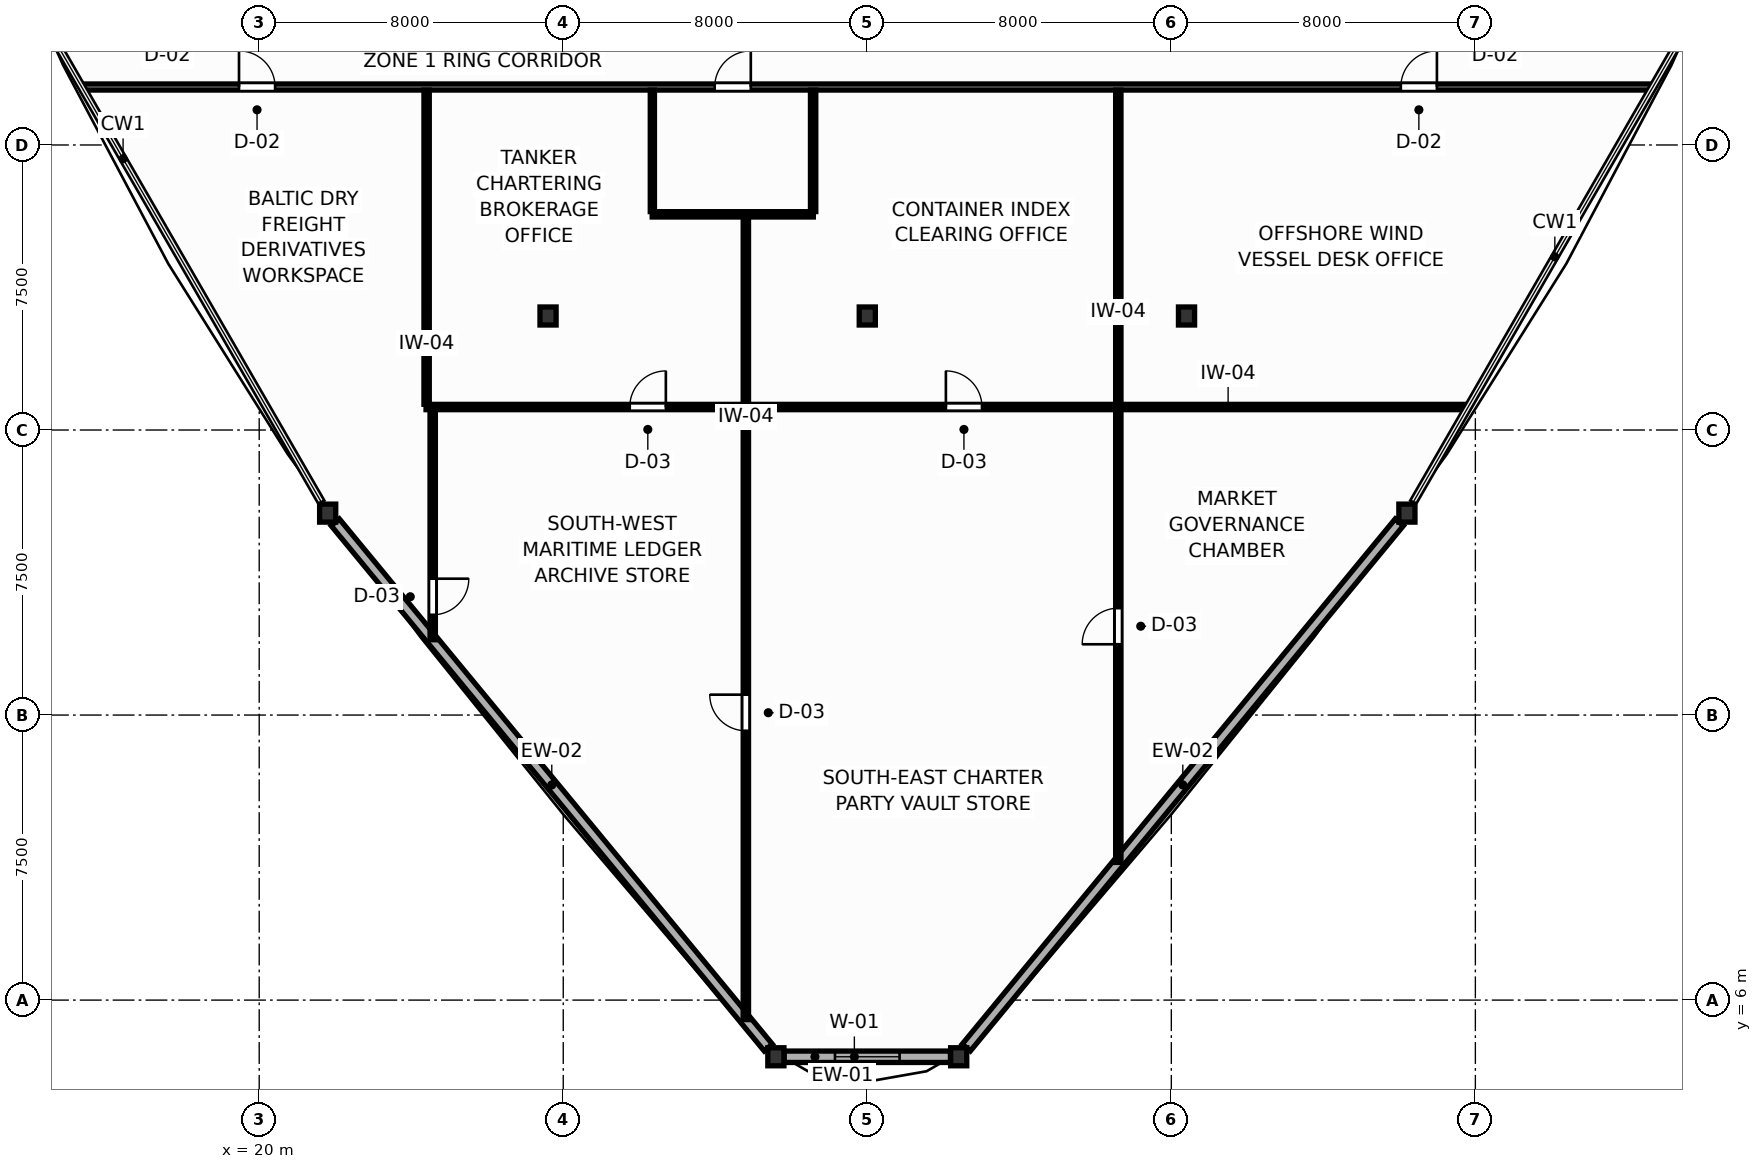
"""IFC4 building model, lengths in metres.
Left out: names, types, materials, properties, quantities, classifications, styles, units other than length and angle.
Written with IfcOpenShell. Run it as: python <this file> out.ifc"""

import sys

from ifc_helpers import new_model, si_unit, direction, frame, frame_2d, origin, origin_2d, place, context, subcontext, project, spatial, rectangle, i_section, extrude, source, transform, mapped, element, fill, save


model = new_model("IFC4")
c1 = context("Model", 3, precision=1e-05, world=origin(), true_north=direction((0.0, 1.0)))
c2 = subcontext(c1, "Body", "Model", "MODEL_VIEW")
j1 = project(units=[si_unit("LENGTHUNIT", "METRE"), si_unit("PLANEANGLEUNIT", "RADIAN")], contexts=[c1])
p1 = place(None, origin())
s1 = spatial("IfcSite", under=j1, at=p1, CompositionType="ELEMENT")
p2 = place(p1, origin())
s2 = spatial("IfcBuilding", under=s1, at=p2, CompositionType="ELEMENT")
p3 = place(p2, frame((0.0, 0.0, 47.4)))
s3 = spatial("IfcBuildingStorey", under=s2, at=p3, CompositionType="ELEMENT", Elevation=47.4)
m1 = source(origin(), c2, "Body", "SweptSolid", [
    extrude(i_section(OverallWidth=0.424, OverallDepth=0.474, WebThickness=0.045, FlangeThickness=0.072, FilletRadius=0.015, at=origin_2d()), origin(), (0.0, 0.0, 1.0), 3.9),
])
for number, where, z_axis, x_axis in (
    (1, (27.6, 24.0, 0.0), (0.0, 0.0, 1.0), (1.0, 0.0, 0.0)),
    (2, (44.4, 24.0, 0.0), (0.0, 0.0, 1.0), (1.0, 0.0, 0.0)),
    (3, (36.0, 24.0, 0.0), (0.0, 0.0, 1.0), (1.0, 0.0, 0.0)),
    (4, (21.802, 18.813, 0.0), (0.0, 0.0, 1.0), (1.0, 0.0, 0.0)),
    (5, (33.595, 4.509, 0.0), (0.0, 0.0, 1.0), (1.0, 0.0, 0.0)),
    (6, (38.405, 4.509, 0.0), (0.0, 0.0, 1.0), (1.0, 0.0, 0.0)),
    (7, (50.198, 18.813, 0.0), (0.0, 0.0, 1.0), (1.0, 0.0, 0.0)),
):
    element("IfcColumn", number, at=place(p3, frame(where, z_axis=z_axis, x_axis=x_axis)), inside=s3, PredefinedType="COLUMN", context=c2, shape_type="MappedRepresentation", body=[
        mapped(m1, transform((0.0, 0.0, 0.0), scale=1.0)),
    ])
p4 = place(p3, frame((22.001, 18.572, 0.0), z_axis=(0.0, 0.0, 1.0), x_axis=(0.636134749951, -0.771577980443, 0.0)))
e8 = element("IfcWall", 8, at=p4, inside=s3, PredefinedType="SOLIDWALL", context=c2, shape_type="SweptSolid", body=[
    extrude(rectangle(XDim=17.912, YDim=0.28, at=frame_2d((8.956, 0.0))), origin(), (0.0, 0.0, 1.0), 3.23),
])
p5 = place(p3, frame((33.812, 4.509, 0.0), z_axis=(0.0, 0.0, 1.0), x_axis=(1.0, 0.0, 0.0)))
e9 = element("IfcWall", 9, at=p5, inside=s3, PredefinedType="SOLIDWALL", context=c2, shape_type="SweptSolid", body=[
    extrude(rectangle(XDim=4.376, YDim=0.3, at=frame_2d((2.188, 0.0))), origin(), (0.0, 0.0, 1.0), 3.23),
])
p6 = place(p5, frame((1.338, 0.0, 0.75)))
e10 = element("IfcOpeningElement", 10, at=p6, cuts=e9, PredefinedType="OPENING", context=c2, shape_type="SweptSolid", body=[
    extrude(rectangle(XDim=1.7, YDim=1.75, at=frame_2d((0.85, 0.875))), frame((0.0, 0.16, 0.0), z_axis=(0.0, -1.0, 0.0), x_axis=(1.0, 0.0, 0.0)), (0.0, 0.0, 1.0), 0.32),
])
p7 = place(p3, frame((38.605, 4.751, 0.0), z_axis=(0.0, 0.0, 1.0), x_axis=(0.636134749951, 0.771577980443, 0.0)))
e11 = element("IfcWall", 11, at=p7, inside=s3, PredefinedType="SOLIDWALL", context=c2, shape_type="SweptSolid", body=[
    extrude(rectangle(XDim=17.912, YDim=0.28, at=frame_2d((8.956, 0.0))), origin(), (0.0, 0.0, 1.0), 3.23),
])
p8 = place(p3, frame((15.348, 30.025, 0.0), z_axis=(0.0, 0.0, 1.0), x_axis=(1.0, 0.0, 0.0)))
e12 = element("IfcWall", 12, at=p8, inside=s3, PredefinedType="PARTITIONING", context=c2, shape_type="SweptSolid", body=[
    extrude(rectangle(XDim=41.303, YDim=0.16, at=frame_2d((20.652, 0.0))), origin(), (0.0, 0.0, 1.0), 3.68),
])
p9 = place(p8, frame((16.636, 0.0, 0.0)))
e13 = element("IfcOpeningElement", 13, at=p9, cuts=e12, PredefinedType="OPENING", context=c2, shape_type="SweptSolid", body=[
    extrude(rectangle(XDim=0.95, YDim=2.05, at=frame_2d((0.475, 1.025))), frame((0.0, 0.09, 0.0), z_axis=(0.0, -1.0, 0.0), x_axis=(1.0, 0.0, 0.0)), (0.0, 0.0, 1.0), 0.18),
])
p10 = place(p8, frame((4.12, 0.0, 0.0)))
e14 = element("IfcOpeningElement", 14, at=p10, cuts=e12, PredefinedType="OPENING", context=c2, shape_type="SweptSolid", body=[
    extrude(rectangle(XDim=0.95, YDim=2.05, at=frame_2d((0.475, 1.025))), frame((0.0, 0.09, 0.0), z_axis=(0.0, -1.0, 0.0), x_axis=(1.0, 0.0, 0.0)), (0.0, 0.0, 1.0), 0.18),
])
p11 = place(p8, frame((34.69, 0.0, 0.0)))
e15 = element("IfcOpeningElement", 15, at=p11, cuts=e12, PredefinedType="OPENING", context=c2, shape_type="SweptSolid", body=[
    extrude(rectangle(XDim=0.95, YDim=2.05, at=frame_2d((0.475, 1.025))), frame((0.0, 0.09, 0.0), z_axis=(0.0, -1.0, 0.0), x_axis=(1.0, 0.0, 0.0)), (0.0, 0.0, 1.0), 0.18),
])
p12 = place(p3, frame((24.39, 21.605, 0.0), z_axis=(0.0, 0.0, 1.0), x_axis=(1.0, 0.0, 0.0)))
e16 = element("IfcWall", 16, at=p12, inside=s3, PredefinedType="PARTITIONING", context=c2, shape_type="SweptSolid", body=[
    extrude(rectangle(XDim=27.4, YDim=0.14, at=frame_2d((13.7, 0.0))), origin(), (0.0, 0.0, 1.0), 3.68),
])
p13 = place(p12, frame((5.36, 0.0, 0.0)))
e17 = element("IfcOpeningElement", 17, at=p13, cuts=e16, PredefinedType="OPENING", context=c2, shape_type="SweptSolid", body=[
    extrude(rectangle(XDim=0.95, YDim=2.05, at=frame_2d((0.475, 1.025))), frame((0.0, 0.08, 0.0), z_axis=(0.0, -1.0, 0.0), x_axis=(1.0, 0.0, 0.0)), (0.0, 0.0, 1.0), 0.16),
])
p14 = place(p12, frame((13.678, 0.0, 0.0)))
e18 = element("IfcOpeningElement", 18, at=p14, cuts=e16, PredefinedType="OPENING", context=c2, shape_type="SweptSolid", body=[
    extrude(rectangle(XDim=0.95, YDim=2.05, at=frame_2d((0.475, 1.025))), frame((0.0, 0.08, 0.0), z_axis=(0.0, -1.0, 0.0), x_axis=(1.0, 0.0, 0.0)), (0.0, 0.0, 1.0), 0.16),
])
p15 = place(p3, frame((32.805, 5.487, 0.0), z_axis=(0.0, 0.0, 1.0), x_axis=(0.0, 1.0, 0.0)))
e19 = element("IfcWall", 19, at=p15, inside=s3, PredefinedType="PARTITIONING", context=c2, shape_type="SweptSolid", body=[
    extrude(rectangle(XDim=21.203, YDim=0.14, at=frame_2d((10.602, 0.0))), origin(), (0.0, 0.0, 1.0), 3.68),
])
p16 = place(p15, frame((7.6, 0.0, 0.0)))
e20 = element("IfcOpeningElement", 20, at=p16, cuts=e19, PredefinedType="OPENING", context=c2, shape_type="SweptSolid", body=[
    extrude(rectangle(XDim=0.95, YDim=2.05, at=frame_2d((0.475, 1.025))), frame((0.0, 0.08, 0.0), z_axis=(0.0, -1.0, 0.0), x_axis=(1.0, 0.0, 0.0)), (0.0, 0.0, 1.0), 0.16),
])
p17 = place(p3, frame((42.605, 9.623, 0.0), z_axis=(0.0, 0.0, 1.0), x_axis=(0.0, 1.0, 0.0)))
e21 = element("IfcWall", 21, at=p17, inside=s3, PredefinedType="PARTITIONING", context=c2, shape_type="SweptSolid", body=[
    extrude(rectangle(XDim=20.32, YDim=0.14, at=frame_2d((10.16, 0.0))), origin(), (0.0, 0.0, 1.0), 3.68),
])
p18 = place(p17, frame((5.74, 0.0, 0.0)))
e22 = element("IfcOpeningElement", 22, at=p18, cuts=e21, PredefinedType="OPENING", context=c2, shape_type="SweptSolid", body=[
    extrude(rectangle(XDim=0.95, YDim=2.05, at=frame_2d((0.475, 1.025))), frame((0.0, 0.08, 0.0), z_axis=(0.0, -1.0, 0.0), x_axis=(1.0, 0.0, 0.0)), (0.0, 0.0, 1.0), 0.16),
])
p19 = place(p3, frame((24.405, 21.677, 0.0), z_axis=(0.0, 0.0, 1.0), x_axis=(0.0, 1.0, 0.0)))
e23 = element("IfcWall", 23, at=p19, inside=s3, PredefinedType="PARTITIONING", context=c2, shape_type="SweptSolid", body=[
    extrude(rectangle(XDim=8.266, YDim=0.14, at=frame_2d((4.133, 0.0))), origin(), (0.0, 0.0, 1.0), 3.68),
])
p20 = place(p3, frame((24.565, 15.482, 0.0), z_axis=(0.0, 0.0, 1.0), x_axis=(0.0, 1.0, 0.0)))
e24 = element("IfcWall", 24, at=p20, inside=s3, PredefinedType="PARTITIONING", context=c2, shape_type="SweptSolid", body=[
    extrude(rectangle(XDim=6.051, YDim=0.14, at=frame_2d((3.026, 0.0))), origin(), (0.0, 0.0, 1.0), 3.68),
])
p21 = place(p20, frame((0.656, 0.0, 0.0)))
e25 = element("IfcOpeningElement", 25, at=p21, cuts=e24, PredefinedType="OPENING", context=c2, shape_type="SweptSolid", body=[
    extrude(rectangle(XDim=0.95, YDim=2.05, at=frame_2d((0.475, 1.025))), frame((0.0, 0.08, 0.0), z_axis=(0.0, -1.0, 0.0), x_axis=(1.0, 0.0, 0.0)), (0.0, 0.0, 1.0), 0.16),
])
p22 = place(p3, frame((30.34, 26.675, 0.0), z_axis=(0.0, 0.0, 1.0), x_axis=(1.0, 0.0, 0.0)))
e26 = element("IfcWall", 26, at=p22, inside=s3, PredefinedType="PARTITIONING", context=c2, shape_type="SweptSolid", body=[
    extrude(rectangle(XDim=4.24, YDim=0.14, at=frame_2d((2.12, 0.0))), origin(), (0.0, 0.0, 1.0), 3.68),
])
p23 = place(p3, frame((30.345, 26.747, 0.0), z_axis=(0.0, 0.0, 1.0), x_axis=(0.0, 1.0, 0.0)))
e27 = element("IfcWall", 27, at=p23, inside=s3, PredefinedType="MOVABLE", context=c2, shape_type="SweptSolid", body=[
    extrude(rectangle(XDim=3.196, YDim=0.11, at=frame_2d((1.598, 0.0))), origin(), (0.0, 0.0, 1.0), 3.68),
])
p24 = place(p3, frame((34.575, 26.747, 0.0), z_axis=(0.0, 0.0, 1.0), x_axis=(0.0, 1.0, 0.0)))
e28 = element("IfcWall", 28, at=p24, inside=s3, PredefinedType="PARTITIONING", context=c2, shape_type="SweptSolid", body=[
    extrude(rectangle(XDim=3.196, YDim=0.14, at=frame_2d((1.598, 0.0))), origin(), (0.0, 0.0, 1.0), 3.68),
])
p25 = place(p6, origin())
e29 = element("IfcWindow", 29, at=p25, inside=s3, PartitioningType="SINGLE_PANEL", PredefinedType="WINDOW", context=c2, shape_type="SweptSolid", body=[
    extrude(rectangle(XDim=1.7, YDim=1.75, at=frame_2d((0.85, 0.875))), frame((0.0, 0.03, 0.0), z_axis=(0.0, -1.0, 0.0), x_axis=(1.0, 0.0, 0.0)), (0.0, 0.0, 1.0), 0.06),
])
fill(e10, e29)
p26 = place(p9, origin())
e30 = element("IfcDoor", 30, at=p26, inside=s3, OperationType="SINGLE_SWING_RIGHT", PredefinedType="DOOR", context=c2, shape_type="SweptSolid", body=[
    extrude(rectangle(XDim=0.95, YDim=2.05, at=frame_2d((0.475, 1.025))), frame((0.0, 0.025, 0.0), z_axis=(0.0, -1.0, 0.0), x_axis=(1.0, 0.0, 0.0)), (0.0, 0.0, 1.0), 0.05),
])
fill(e13, e30)
p27 = place(p10, origin())
e31 = element("IfcDoor", 31, at=p27, inside=s3, OperationType="SINGLE_SWING_LEFT", PredefinedType="DOOR", context=c2, shape_type="SweptSolid", body=[
    extrude(rectangle(XDim=0.95, YDim=2.05, at=frame_2d((0.475, 1.025))), frame((0.0, 0.025, 0.0), z_axis=(0.0, -1.0, 0.0), x_axis=(1.0, 0.0, 0.0)), (0.0, 0.0, 1.0), 0.05),
])
fill(e14, e31)
p28 = place(p11, origin())
e32 = element("IfcDoor", 32, at=p28, inside=s3, OperationType="SINGLE_SWING_RIGHT", PredefinedType="DOOR", context=c2, shape_type="SweptSolid", body=[
    extrude(rectangle(XDim=0.95, YDim=2.05, at=frame_2d((0.475, 1.025))), frame((0.0, 0.025, 0.0), z_axis=(0.0, -1.0, 0.0), x_axis=(1.0, 0.0, 0.0)), (0.0, 0.0, 1.0), 0.05),
])
fill(e15, e32)
p29 = place(p13, origin())
e33 = element("IfcDoor", 33, at=p29, inside=s3, OperationType="SINGLE_SWING_RIGHT", PredefinedType="DOOR", context=c2, shape_type="SweptSolid", body=[
    extrude(rectangle(XDim=0.95, YDim=2.05, at=frame_2d((0.475, 1.025))), frame((0.0, 0.025, 0.0), z_axis=(0.0, -1.0, 0.0), x_axis=(1.0, 0.0, 0.0)), (0.0, 0.0, 1.0), 0.05),
])
fill(e17, e33)
p30 = place(p14, origin())
e34 = element("IfcDoor", 34, at=p30, inside=s3, OperationType="SINGLE_SWING_LEFT", PredefinedType="DOOR", context=c2, shape_type="SweptSolid", body=[
    extrude(rectangle(XDim=0.95, YDim=2.05, at=frame_2d((0.475, 1.025))), frame((0.0, 0.025, 0.0), z_axis=(0.0, -1.0, 0.0), x_axis=(1.0, 0.0, 0.0)), (0.0, 0.0, 1.0), 0.05),
])
fill(e18, e34)
p31 = place(p16, origin())
e35 = element("IfcDoor", 35, at=p31, inside=s3, OperationType="SINGLE_SWING_RIGHT", PredefinedType="DOOR", context=c2, shape_type="SweptSolid", body=[
    extrude(rectangle(XDim=0.95, YDim=2.05, at=frame_2d((0.475, 1.025))), frame((0.0, 0.025, 0.0), z_axis=(0.0, -1.0, 0.0), x_axis=(1.0, 0.0, 0.0)), (0.0, 0.0, 1.0), 0.05),
])
fill(e20, e35)
p32 = place(p18, origin())
e36 = element("IfcDoor", 36, at=p32, inside=s3, OperationType="SINGLE_SWING_LEFT", PredefinedType="DOOR", context=c2, shape_type="SweptSolid", body=[
    extrude(rectangle(XDim=0.95, YDim=2.05, at=frame_2d((0.475, 1.025))), frame((0.0, 0.025, 0.0), z_axis=(0.0, -1.0, 0.0), x_axis=(1.0, 0.0, 0.0)), (0.0, 0.0, 1.0), 0.05),
])
fill(e22, e36)
p33 = place(p21, frame((0.95, 0.0, 0.0), z_axis=(0.0, 0.0, 1.0), x_axis=(-1.0, 0.0, 0.0)))
e37 = element("IfcDoor", 37, at=p33, inside=s3, OperationType="SINGLE_SWING_LEFT", PredefinedType="DOOR", context=c2, shape_type="SweptSolid", body=[
    extrude(rectangle(XDim=0.95, YDim=2.05, at=frame_2d((0.475, 1.025))), frame((0.0, 0.025, 0.0), z_axis=(0.0, -1.0, 0.0), x_axis=(1.0, 0.0, 0.0)), (0.0, 0.0, 1.0), 0.05),
])
fill(e25, e37)
save(model, sys.argv[1])
